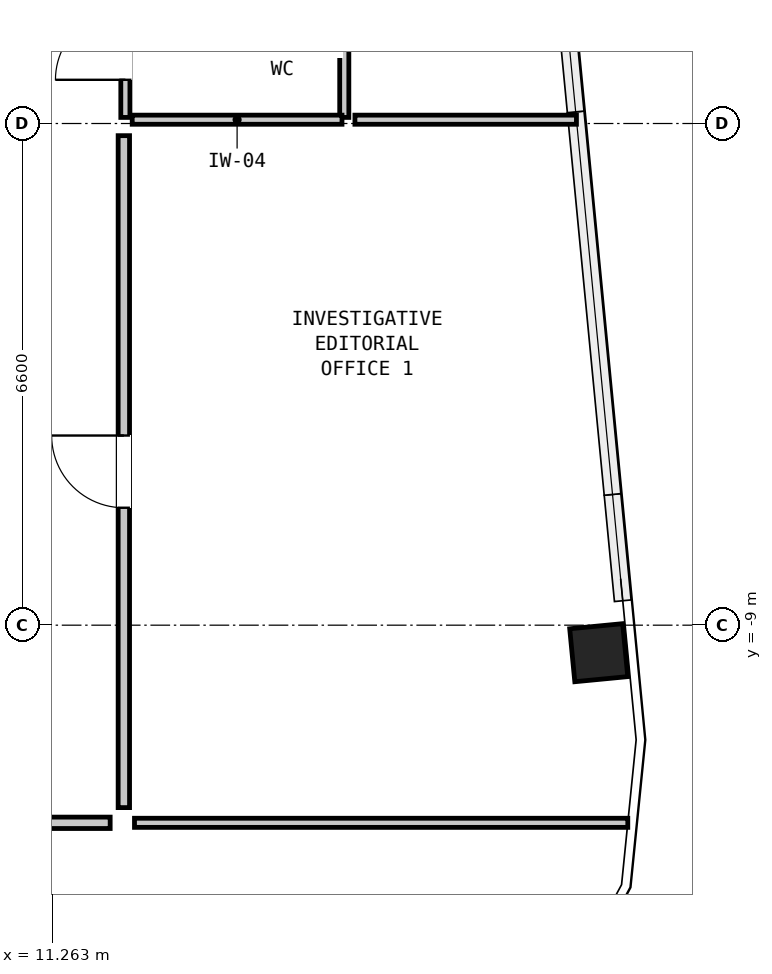
"""IFC4 building model, lengths in metres.
Left out: names, types, materials, properties, quantities, classifications, styles, units other than length and angle.
Written with IfcOpenShell. Run it as: python <this file> out.ifc"""

import sys

from ifc_helpers import new_model, si_unit, direction, frame, frame_2d, origin, origin_2d, place, context, subcontext, project, spatial, rectangle, hollow_rectangle, extrude, element, fill, save


model = new_model("IFC4")
c1 = context("Model", 3, precision=1e-05, world=origin(), true_north=direction((0.0, 1.0)))
c2 = subcontext(c1, "Body", "Model", "MODEL_VIEW")
j1 = project(units=[si_unit("LENGTHUNIT", "METRE"), si_unit("PLANEANGLEUNIT", "RADIAN")], contexts=[c1])
p1 = place(None, origin())
s1 = spatial("IfcSite", under=j1, at=p1, CompositionType="ELEMENT")
p2 = place(p1, origin())
s2 = spatial("IfcBuilding", under=s1, at=p2, CompositionType="ELEMENT")
p3 = place(p2, frame((0.0, 0.0, 165.3)))
s3 = spatial("IfcBuildingStorey", under=s2, at=p3, CompositionType="ELEMENT", Elevation=165.3)
p4 = place(p3, frame((18.448, -9.362, 0.0), z_axis=(0.0, 0.0, 1.0), x_axis=(-0.09584575252, 0.995396198367, 0.0)))
e1 = element("IfcColumn", 1, at=p4, inside=s3, PredefinedType="COLUMN", context=c2, shape_type="SweptSolid", body=[
    extrude(hollow_rectangle(XDim=0.7, YDim=0.7, WallThickness=0.045, at=origin_2d()), origin(), (0.0, 0.0, 1.0), 3.05),
])
p5 = place(p3, frame((12.22, -2.32, 0.0), z_axis=(0.0, 0.0, 1.0), x_axis=(0.0, 1.0, 0.0)))
e2 = element("IfcWall", 2, at=p5, inside=s3, PredefinedType="PARTITIONING", context=c2, shape_type="SweptSolid", body=[
    extrude(rectangle(XDim=1.94, YDim=0.12, at=frame_2d((0.97, 0.0))), origin(), (0.0, 0.0, 1.0), 2.83),
])
p6 = place(p5, frame((0.495, 0.0, 0.0)))
e3 = element("IfcOpeningElement", 3, at=p6, cuts=e2, PredefinedType="OPENING", context=c2, shape_type="SweptSolid", body=[
    extrude(rectangle(XDim=0.92, YDim=2.1, at=frame_2d((0.46, 1.05))), frame((0.0, 0.072, 0.0), z_axis=(0.0, -1.0, 0.0), x_axis=(1.0, 0.0, 0.0)), (0.0, 0.0, 1.0), 0.144),
])
p7 = place(p3, frame((15.1, -2.32, 0.0), z_axis=(0.0, 0.0, 1.0), x_axis=(0.0, 1.0, 0.0)))
e4 = element("IfcWall", 4, at=p7, inside=s3, PredefinedType="PARTITIONING", context=c2, shape_type="SweptSolid", body=[
    extrude(rectangle(XDim=5.93, YDim=0.12, at=frame_2d((2.965, 0.0))), origin(), (0.0, 0.0, 1.0), 2.83),
])
p8 = place(p3, frame((12.31, -2.35, 0.0), z_axis=(0.0, 0.0, 1.0), x_axis=(1.0, 0.0, 0.0)))
e5 = element("IfcWall", 5, at=p8, inside=s3, PredefinedType="PARTITIONING", context=c2, shape_type="SweptSolid", body=[
    extrude(rectangle(XDim=2.76, YDim=0.12, at=frame_2d((1.38, 0.0))), origin(), (0.0, 0.0, 1.0), 1.883),
])
p9 = place(p3, frame((12.34, -11.6, 0.0), z_axis=(0.0, 0.0, 1.0), x_axis=(1.0, 0.0, 0.0)))
e6 = element("IfcWall", 6, at=p9, inside=s3, PredefinedType="PARTITIONING", context=c2, shape_type="SweptSolid", body=[
    extrude(rectangle(XDim=6.49, YDim=0.12, at=frame_2d((3.245, 0.0))), origin(), (0.0, 0.0, 1.0), 2.347),
])
p10 = place(p3, frame((15.24, -2.35, 0.0), z_axis=(0.0, 0.0, 1.0), x_axis=(1.0, 0.0, 0.0)))
e7 = element("IfcWall", 7, at=p10, inside=s3, PredefinedType="PARTITIONING", context=c2, shape_type="SweptSolid", body=[
    extrude(rectangle(XDim=2.914, YDim=0.12, at=frame_2d((1.457, 0.0))), origin(), (0.0, 0.0, 1.0), 1.883),
])
p11 = place(p3, frame((8.58, -11.6, 0.0), z_axis=(0.0, 0.0, 1.0), x_axis=(1.0, 0.0, 0.0)))
e8 = element("IfcWall", 8, at=p11, inside=s3, PredefinedType="PARTITIONING", context=c2, shape_type="SweptSolid", body=[
    extrude(rectangle(XDim=3.44, YDim=0.15, at=frame_2d((1.72, 0.0))), origin(), (0.0, 0.0, 1.0), 2.347),
])
p12 = place(p11, frame((1.245, 0.0, 0.0)))
e9 = element("IfcOpeningElement", 9, at=p12, cuts=e8, PredefinedType="OPENING", context=c2, shape_type="SweptSolid", body=[
    extrude(rectangle(XDim=0.95, YDim=2.1, at=frame_2d((0.475, 1.05))), frame((0.0, 0.087, 0.0), z_axis=(0.0, -1.0, 0.0), x_axis=(1.0, 0.0, 0.0)), (0.0, 0.0, 1.0), 0.174),
])
p13 = place(p3, frame((12.2, -11.4, 0.0), z_axis=(0.0, 0.0, 1.0), x_axis=(0.0, 1.0, 0.0)))
e10 = element("IfcWall", 10, at=p13, inside=s3, PredefinedType="PARTITIONING", context=c2, shape_type="SweptSolid", body=[
    extrude(rectangle(XDim=8.84, YDim=0.15, at=frame_2d((4.42, 0.0))), origin(), (0.0, 0.0, 1.0), 2.83),
])
p14 = place(p13, frame((3.945, 0.0, 0.0)))
e11 = element("IfcOpeningElement", 11, at=p14, cuts=e10, PredefinedType="OPENING", context=c2, shape_type="SweptSolid", body=[
    extrude(rectangle(XDim=0.95, YDim=2.1, at=frame_2d((0.475, 1.05))), frame((0.0, 0.087, 0.0), z_axis=(0.0, -1.0, 0.0), x_axis=(1.0, 0.0, 0.0)), (0.0, 0.0, 1.0), 0.174),
])
p15 = place(p6, origin())
e12 = element("IfcDoor", 12, at=p15, inside=s3, OperationType="SINGLE_SWING_LEFT", PredefinedType="DOOR", context=c2, shape_type="SweptSolid", body=[
    extrude(rectangle(XDim=0.92, YDim=2.1, at=frame_2d((0.46, 1.05))), frame((0.0, 0.025, 0.0), z_axis=(0.0, -1.0, 0.0), x_axis=(1.0, 0.0, 0.0)), (0.0, 0.0, 1.0), 0.05),
])
fill(e3, e12)
p16 = place(p14, origin())
e13 = element("IfcDoor", 13, at=p16, inside=s3, OperationType="SINGLE_SWING_RIGHT", PredefinedType="DOOR", context=c2, shape_type="SweptSolid", body=[
    extrude(rectangle(XDim=0.95, YDim=2.1, at=frame_2d((0.475, 1.05))), frame((0.0, 0.025, 0.0), z_axis=(0.0, -1.0, 0.0), x_axis=(1.0, 0.0, 0.0)), (0.0, 0.0, 1.0), 0.05),
])
fill(e11, e13)
save(model, sys.argv[1])
